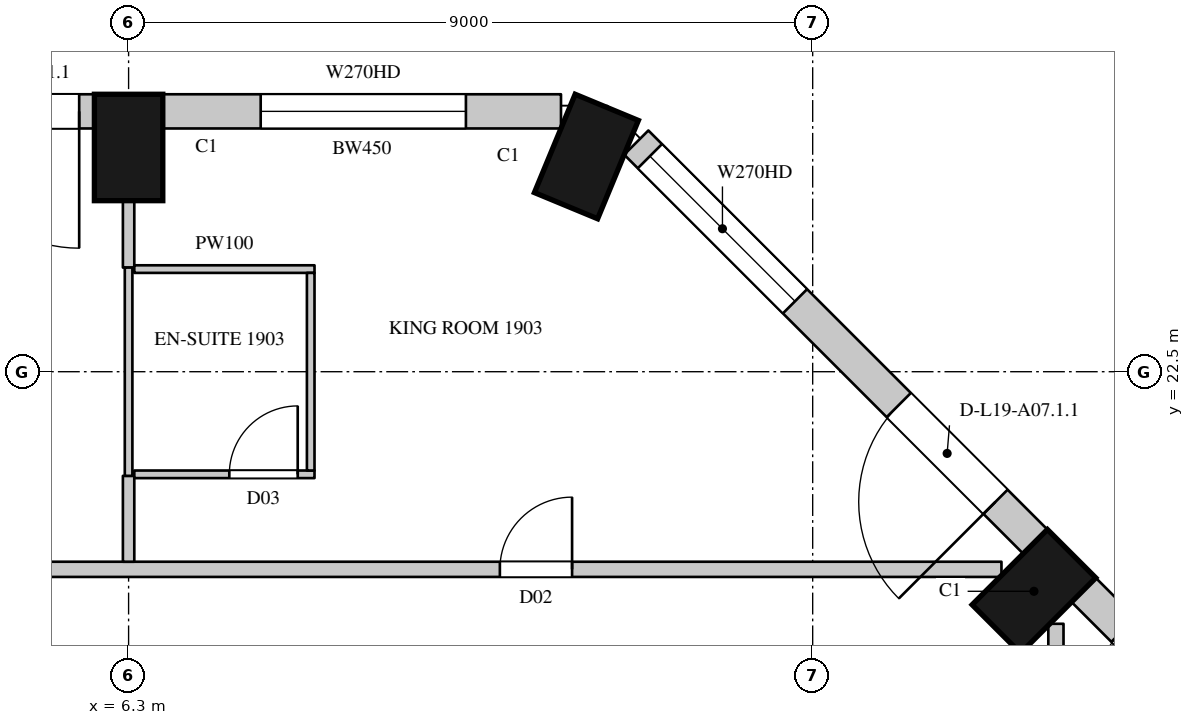
"""IFC4 building model, lengths in metres.
Left out: names, types, materials, properties, quantities, classifications, styles, units other than length and angle.
Written with IfcOpenShell. Run it as: python <this file> out.ifc"""

import sys

from ifc_helpers import new_model, si_unit, direction, frame, frame_2d, origin, origin_2d, place, context, subcontext, project, spatial, rectangle, extrude, element, fill, save


model = new_model("IFC4")
c1 = context("Model", 3, precision=1e-05, world=origin(), true_north=direction((0.0, 1.0)))
c2 = subcontext(c1, "Body", "Model", "MODEL_VIEW")
j1 = project(units=[si_unit("LENGTHUNIT", "METRE"), si_unit("PLANEANGLEUNIT", "RADIAN")], contexts=[c1])
p1 = place(None, origin())
s1 = spatial("IfcSite", under=j1, at=p1, CompositionType="ELEMENT")
p2 = place(p1, origin())
s2 = spatial("IfcBuilding", under=s1, at=p2, CompositionType="ELEMENT")
p3 = place(p2, frame((0.0, 0.0, 98.7)))
s3 = spatial("IfcBuildingStorey", under=s2, at=p3, CompositionType="ELEMENT", Elevation=98.7)
for number, where, z_axis, x_axis in (
    (1, (18.211, 19.611, 0.0), (0.0, 0.0, 1.0), (-0.707, 0.707, 0.0)),
    (2, (12.323, 25.331, 0.0), (0.0, 0.0, 1.0), (-0.924, 0.383, 0.0)),
    (3, (6.3, 25.45, 0.0), (0.0, 0.0, 1.0), (-1.0, 0.0, 0.0)),
):
    element("IfcColumn", number, at=place(p3, frame(where, z_axis=z_axis, x_axis=x_axis)), inside=s3, PredefinedType="COLUMN", context=c2, shape_type="SweptSolid", body=[
        extrude(rectangle(XDim=0.9, YDim=1.4, at=origin_2d()), origin(), (0.0, 0.0, 1.0), 3.6),
    ])
p4 = place(p3, frame((24.115, 14.379, 0.0), z_axis=(0.0, 0.0, 1.0), x_axis=(-0.707106781187, 0.707106781187, 0.0)))
e4 = element("IfcWall", 4, at=p4, inside=s3, PredefinedType="SOLIDWALL", context=c2, shape_type="SweptSolid", body=[
    extrude(rectangle(XDim=7.424, YDim=0.45, at=frame_2d((3.712, 0.0))), origin(), (0.0, 0.0, 1.0), 3.3),
])
p5 = place(p4, frame((0.253, 0.0, 1.05)))
e5 = element("IfcOpeningElement", 5, at=p5, cuts=e4, PredefinedType="OPENING", context=c2, shape_type="SweptSolid", body=[
    extrude(rectangle(XDim=2.7, YDim=2.0, at=frame_2d((1.35, 1.0))), frame((0.0, 0.235, 0.0), z_axis=(0.0, -1.0, 0.0), x_axis=(1.0, 0.0, 0.0)), (0.0, 0.0, 1.0), 0.47),
])
p6 = place(p4, frame((4.884, 0.0, 0.0)))
e6 = element("IfcOpeningElement", 6, at=p6, cuts=e4, PredefinedType="OPENING", context=c2, shape_type="SweptSolid", body=[
    extrude(rectangle(XDim=1.8, YDim=2.4, at=frame_2d((0.9, 1.2))), frame((0.0, 0.235, 0.0), z_axis=(0.0, -1.0, 0.0), x_axis=(1.0, 0.0, 0.0)), (0.0, 0.0, 1.0), 0.47),
])
p7 = place(p3, frame((18.229, 20.265, 0.0), z_axis=(0.0, 0.0, 1.0), x_axis=(-0.707106781187, 0.707106781187, 0.0)))
e7 = element("IfcWall", 7, at=p7, inside=s3, PredefinedType="SOLIDWALL", context=c2, shape_type="SweptSolid", body=[
    extrude(rectangle(XDim=7.424, YDim=0.45, at=frame_2d((3.712, 0.0))), origin(), (0.0, 0.0, 1.0), 3.3),
])
p8 = place(p7, frame((0.74, 0.0, 0.0)))
e8 = element("IfcOpeningElement", 8, at=p8, cuts=e7, PredefinedType="OPENING", context=c2, shape_type="SweptSolid", body=[
    extrude(rectangle(XDim=1.8, YDim=2.4, at=frame_2d((0.9, 1.2))), frame((0.0, 0.235, 0.0), z_axis=(0.0, -1.0, 0.0), x_axis=(1.0, 0.0, 0.0)), (0.0, 0.0, 1.0), 0.47),
])
p9 = place(p7, frame((4.471, 0.0, 1.05)))
e9 = element("IfcOpeningElement", 9, at=p9, cuts=e7, PredefinedType="OPENING", context=c2, shape_type="SweptSolid", body=[
    extrude(rectangle(XDim=2.7, YDim=2.0, at=frame_2d((1.35, 1.0))), frame((0.0, 0.235, 0.0), z_axis=(0.0, -1.0, 0.0), x_axis=(1.0, 0.0, 0.0)), (0.0, 0.0, 1.0), 0.47),
])
p10 = place(p3, frame((11.989, 25.925, 0.0), z_axis=(0.0, 0.0, 1.0), x_axis=(-1.0, 0.0, 0.0)))
e10 = element("IfcWall", 10, at=p10, inside=s3, PredefinedType="SOLIDWALL", context=c2, shape_type="SweptSolid", body=[
    extrude(rectangle(XDim=5.239, YDim=0.45, at=frame_2d((2.619, 0.0))), origin(), (0.0, 0.0, 1.0), 3.3),
])
p11 = place(p10, frame((1.251, 0.0, 1.05)))
e11 = element("IfcOpeningElement", 11, at=p11, cuts=e10, PredefinedType="OPENING", context=c2, shape_type="SweptSolid", body=[
    extrude(rectangle(XDim=2.7, YDim=2.0, at=frame_2d((1.35, 1.0))), frame((0.0, 0.235, 0.0), z_axis=(0.0, -1.0, 0.0), x_axis=(1.0, 0.0, 0.0)), (0.0, 0.0, 1.0), 0.47),
])
p12 = place(p3, frame((5.85, 25.925, 0.0), z_axis=(0.0, 0.0, 1.0), x_axis=(-1.0, 0.0, 0.0)))
e12 = element("IfcWall", 12, at=p12, inside=s3, PredefinedType="SOLIDWALL", context=c2, shape_type="SweptSolid", body=[
    extrude(rectangle(XDim=8.1, YDim=0.45, at=frame_2d((4.05, 0.0))), origin(), (0.0, 0.0, 1.0), 3.3),
])
p13 = place(p12, frame((0.2, 0.0, 0.0)))
e13 = element("IfcOpeningElement", 13, at=p13, cuts=e12, PredefinedType="OPENING", context=c2, shape_type="SweptSolid", body=[
    extrude(rectangle(XDim=1.8, YDim=2.4, at=frame_2d((0.9, 1.2))), frame((0.0, 0.235, 0.0), z_axis=(0.0, -1.0, 0.0), x_axis=(1.0, 0.0, 0.0)), (0.0, 0.0, 1.0), 0.47),
])
p14 = place(p12, frame((2.2, 0.0, 1.05)))
e14 = element("IfcOpeningElement", 14, at=p14, cuts=e12, PredefinedType="OPENING", context=c2, shape_type="SweptSolid", body=[
    extrude(rectangle(XDim=1.2, YDim=2.0, at=frame_2d((0.6, 1.0))), frame((0.0, 0.235, 0.0), z_axis=(0.0, -1.0, 0.0), x_axis=(1.0, 0.0, 0.0)), (0.0, 0.0, 1.0), 0.47),
])
p15 = place(p12, frame((4.7, 0.0, 0.0)))
e15 = element("IfcOpeningElement", 15, at=p15, cuts=e12, PredefinedType="OPENING", context=c2, shape_type="SweptSolid", body=[
    extrude(rectangle(XDim=1.8, YDim=2.4, at=frame_2d((0.9, 1.2))), frame((0.0, 0.235, 0.0), z_axis=(0.0, -1.0, 0.0), x_axis=(1.0, 0.0, 0.0)), (0.0, 0.0, 1.0), 0.47),
])
p16 = place(p12, frame((6.7, 0.0, 1.05)))
e16 = element("IfcOpeningElement", 16, at=p16, cuts=e12, PredefinedType="OPENING", context=c2, shape_type="SweptSolid", body=[
    extrude(rectangle(XDim=1.2, YDim=2.0, at=frame_2d((0.6, 1.0))), frame((0.0, 0.235, 0.0), z_axis=(0.0, -1.0, 0.0), x_axis=(1.0, 0.0, 0.0)), (0.0, 0.0, 1.0), 0.47),
])
p17 = place(p3, frame((19.937, 20.078, 0.0), z_axis=(0.0, 0.0, 1.0), x_axis=(-0.707106781187, 0.707106781187, 0.0)))
e17 = element("IfcWall", 17, at=p17, inside=s3, PredefinedType="SOLIDWALL", context=c2, shape_type="SweptSolid", body=[
    extrude(rectangle(XDim=1.781, YDim=0.45, at=frame_2d((0.89, 0.0))), origin(), (0.0, 0.0, 1.0), 0.6),
])
p18 = place(p3, frame((16.486, 23.529, 0.0), z_axis=(0.0, 0.0, 1.0), x_axis=(-0.707022305137, 0.707191247145, 0.0)))
e18 = element("IfcWall", 18, at=p18, inside=s3, PredefinedType="SOLIDWALL", context=c2, shape_type="SweptSolid", body=[
    extrude(rectangle(XDim=1.445, YDim=0.45, at=frame_2d((0.723, 0.0))), origin(), (0.0, 0.0, 1.0), 0.6),
])
p19 = place(p3, frame((-23.765, 19.9, 0.0), z_axis=(0.0, 0.0, 1.0), x_axis=(1.0, 0.0, 0.0)))
e19 = element("IfcWall", 19, at=p19, inside=s3, PredefinedType="PARTITIONING", context=c2, shape_type="SweptSolid", body=[
    extrude(rectangle(XDim=41.549, YDim=0.2, at=frame_2d((20.774, 0.0))), origin(), (0.0, 0.0, 1.0), 3.3),
])
p20 = place(p19, frame((14.2, 0.0, 0.0)))
e20 = element("IfcOpeningElement", 20, at=p20, cuts=e19, PredefinedType="OPENING", context=c2, shape_type="SweptSolid", body=[
    extrude(rectangle(XDim=0.9, YDim=2.2, at=frame_2d((0.45, 1.1))), frame((0.0, 0.11, 0.0), z_axis=(0.0, -1.0, 0.0), x_axis=(1.0, 0.0, 0.0)), (0.0, 0.0, 1.0), 0.22),
])
p21 = place(p19, frame((27.05, 0.0, 0.0)))
e21 = element("IfcOpeningElement", 21, at=p21, cuts=e19, PredefinedType="OPENING", context=c2, shape_type="SweptSolid", body=[
    extrude(rectangle(XDim=0.9, YDim=2.2, at=frame_2d((0.45, 1.1))), frame((0.0, 0.11, 0.0), z_axis=(0.0, -1.0, 0.0), x_axis=(1.0, 0.0, 0.0)), (0.0, 0.0, 1.0), 0.22),
])
p22 = place(p19, frame((0.75, 0.0, 0.0)))
e22 = element("IfcOpeningElement", 22, at=p22, cuts=e19, PredefinedType="OPENING", context=c2, shape_type="SweptSolid", body=[
    extrude(rectangle(XDim=1.1, YDim=2.4, at=frame_2d((0.55, 1.2))), frame((0.0, 0.11, 0.0), z_axis=(0.0, -1.0, 0.0), x_axis=(1.0, 0.0, 0.0)), (0.0, 0.0, 1.0), 0.22),
])
p23 = place(p19, frame((23.15, 0.0, 0.0)))
e23 = element("IfcOpeningElement", 23, at=p23, cuts=e19, PredefinedType="OPENING", context=c2, shape_type="SweptSolid", body=[
    extrude(rectangle(XDim=0.95, YDim=2.2, at=frame_2d((0.475, 1.1))), frame((0.0, 0.11, 0.0), z_axis=(0.0, -1.0, 0.0), x_axis=(1.0, 0.0, 0.0)), (0.0, 0.0, 1.0), 0.22),
])
p24 = place(p19, frame((34.95, 0.0, 0.0)))
e24 = element("IfcOpeningElement", 24, at=p24, cuts=e19, PredefinedType="OPENING", context=c2, shape_type="SweptSolid", body=[
    extrude(rectangle(XDim=0.95, YDim=2.2, at=frame_2d((0.475, 1.1))), frame((0.0, 0.11, 0.0), z_axis=(0.0, -1.0, 0.0), x_axis=(1.0, 0.0, 0.0)), (0.0, 0.0, 1.0), 0.22),
])
p25 = place(p3, frame((18.5, 4.75, 0.0), z_axis=(0.0, 0.0, 1.0), x_axis=(0.0, 1.0, 0.0)))
e25 = element("IfcWall", 25, at=p25, inside=s3, PredefinedType="PARTITIONING", context=c2, shape_type="SweptSolid", body=[
    extrude(rectangle(XDim=14.434, YDim=0.2, at=frame_2d((7.217, 0.0))), origin(), (0.0, 0.0, 1.0), 3.3),
])
p26 = place(p25, frame((7.65, 0.0, 0.0)))
e26 = element("IfcOpeningElement", 26, at=p26, cuts=e25, PredefinedType="OPENING", context=c2, shape_type="SweptSolid", body=[
    extrude(rectangle(XDim=0.95, YDim=2.2, at=frame_2d((0.475, 1.1))), frame((0.0, 0.11, 0.0), z_axis=(0.0, -1.0, 0.0), x_axis=(1.0, 0.0, 0.0)), (0.0, 0.0, 1.0), 0.22),
])
p27 = place(p3, frame((6.3, 20.0, 0.0), z_axis=(0.0, 0.0, 1.0), x_axis=(0.0, 1.0, 0.0)))
e27 = element("IfcWall", 27, at=p27, inside=s3, PredefinedType="PARTITIONING", context=c2, shape_type="SweptSolid", body=[
    extrude(rectangle(XDim=1.13, YDim=0.15, at=frame_2d((0.565, 0.0))), origin(), (0.0, 0.0, 1.0), 2.75),
])
p28 = place(p3, frame((6.3, 23.87, 0.0), z_axis=(0.0, 0.0, 1.0), x_axis=(0.0, 1.0, 0.0)))
e28 = element("IfcWall", 28, at=p28, inside=s3, PredefinedType="PARTITIONING", context=c2, shape_type="SweptSolid", body=[
    extrude(rectangle(XDim=0.88, YDim=0.15, at=frame_2d((0.44, 0.0))), origin(), (0.0, 0.0, 1.0), 2.75),
])
p29 = place(p3, frame((6.3, 21.13, 0.0), z_axis=(0.0, 0.0, 1.0), x_axis=(0.0, 1.0, 0.0)))
e29 = element("IfcWall", 29, at=p29, inside=s3, PredefinedType="PARTITIONING", context=c2, shape_type="SweptSolid", body=[
    extrude(rectangle(XDim=2.74, YDim=0.1, at=frame_2d((1.37, 0.0))), origin(), (0.0, 0.0, 1.0), 2.75),
])
p30 = place(p3, frame((6.375, 21.15, 0.0), z_axis=(0.0, 0.0, 1.0), x_axis=(1.0, 0.0, 0.0)))
e30 = element("IfcWall", 30, at=p30, inside=s3, PredefinedType="PARTITIONING", context=c2, shape_type="SweptSolid", body=[
    extrude(rectangle(XDim=2.371, YDim=0.1, at=frame_2d((1.186, 0.0))), origin(), (0.0, 0.0, 1.0), 3.3),
])
p31 = place(p30, frame((1.25, 0.0, 0.0)))
e31 = element("IfcOpeningElement", 31, at=p31, cuts=e30, PredefinedType="OPENING", context=c2, shape_type="SweptSolid", body=[
    extrude(rectangle(XDim=0.9, YDim=2.2, at=frame_2d((0.45, 1.1))), frame((0.0, 0.06, 0.0), z_axis=(0.0, -1.0, 0.0), x_axis=(1.0, 0.0, 0.0)), (0.0, 0.0, 1.0), 0.12),
])
p32 = place(p3, frame((6.375, 23.85, 0.0), z_axis=(0.0, 0.0, 1.0), x_axis=(1.0, 0.0, 0.0)))
e32 = element("IfcWall", 32, at=p32, inside=s3, PredefinedType="PARTITIONING", context=c2, shape_type="SweptSolid", body=[
    extrude(rectangle(XDim=2.371, YDim=0.1, at=frame_2d((1.186, 0.0))), origin(), (0.0, 0.0, 1.0), 3.3),
])
p33 = place(p3, frame((8.696, 21.2, 0.0), z_axis=(0.0, 0.0, 1.0), x_axis=(0.0, 1.0, 0.0)))
e33 = element("IfcWall", 33, at=p33, inside=s3, PredefinedType="PARTITIONING", context=c2, shape_type="SweptSolid", body=[
    extrude(rectangle(XDim=2.6, YDim=0.1, at=frame_2d((1.3, 0.0))), origin(), (0.0, 0.0, 1.0), 3.3),
])
p34 = place(p8, origin())
e34 = element("IfcDoor", 34, at=p34, inside=s3, OperationType="SLIDING_TO_LEFT", PredefinedType="DOOR", context=c2, shape_type="SweptSolid", body=[
    extrude(rectangle(XDim=1.8, YDim=2.4, at=frame_2d((0.9, 1.2))), frame((0.0, 0.13, 0.0), z_axis=(0.0, -1.0, 0.0), x_axis=(1.0, 0.0, 0.0)), (0.0, 0.0, 1.0), 0.05),
])
fill(e8, e34)
p35 = place(p9, origin())
e35 = element("IfcWindow", 35, at=p35, inside=s3, PartitioningType="SINGLE_PANEL", PredefinedType="WINDOW", context=c2, shape_type="SweptSolid", body=[
    extrude(rectangle(XDim=2.7, YDim=2.0, at=frame_2d((1.35, 1.0))), frame((0.0, 0.135, 0.0), z_axis=(0.0, -1.0, 0.0), x_axis=(1.0, 0.0, 0.0)), (0.0, 0.0, 1.0), 0.06),
])
fill(e9, e35)
p36 = place(p11, origin())
e36 = element("IfcWindow", 36, at=p36, inside=s3, PartitioningType="SINGLE_PANEL", PredefinedType="WINDOW", context=c2, shape_type="SweptSolid", body=[
    extrude(rectangle(XDim=2.7, YDim=2.0, at=frame_2d((1.35, 1.0))), frame((0.0, 0.135, 0.0), z_axis=(0.0, -1.0, 0.0), x_axis=(1.0, 0.0, 0.0)), (0.0, 0.0, 1.0), 0.06),
])
fill(e11, e36)
p37 = place(p13, origin())
e37 = element("IfcDoor", 37, at=p37, inside=s3, OperationType="SLIDING_TO_LEFT", PredefinedType="DOOR", context=c2, shape_type="SweptSolid", body=[
    extrude(rectangle(XDim=1.8, YDim=2.4, at=frame_2d((0.9, 1.2))), frame((0.0, 0.13, 0.0), z_axis=(0.0, -1.0, 0.0), x_axis=(1.0, 0.0, 0.0)), (0.0, 0.0, 1.0), 0.05),
])
fill(e13, e37)
p38 = place(p24, origin())
e38 = element("IfcDoor", 38, at=p38, inside=s3, OperationType="SINGLE_SWING_RIGHT", PredefinedType="DOOR", context=c2, shape_type="SweptSolid", body=[
    extrude(rectangle(XDim=0.95, YDim=2.2, at=frame_2d((0.475, 1.1))), frame((0.0, 0.025, 0.0), z_axis=(0.0, -1.0, 0.0), x_axis=(1.0, 0.0, 0.0)), (0.0, 0.0, 1.0), 0.05),
])
fill(e24, e38)
p39 = place(p31, origin())
e39 = element("IfcDoor", 39, at=p39, inside=s3, OperationType="SINGLE_SWING_RIGHT", PredefinedType="DOOR", context=c2, shape_type="SweptSolid", body=[
    extrude(rectangle(XDim=0.9, YDim=2.2, at=frame_2d((0.45, 1.1))), frame((0.0, 0.025, 0.0), z_axis=(0.0, -1.0, 0.0), x_axis=(1.0, 0.0, 0.0)), (0.0, 0.0, 1.0), 0.05),
])
fill(e31, e39)
save(model, sys.argv[1])
